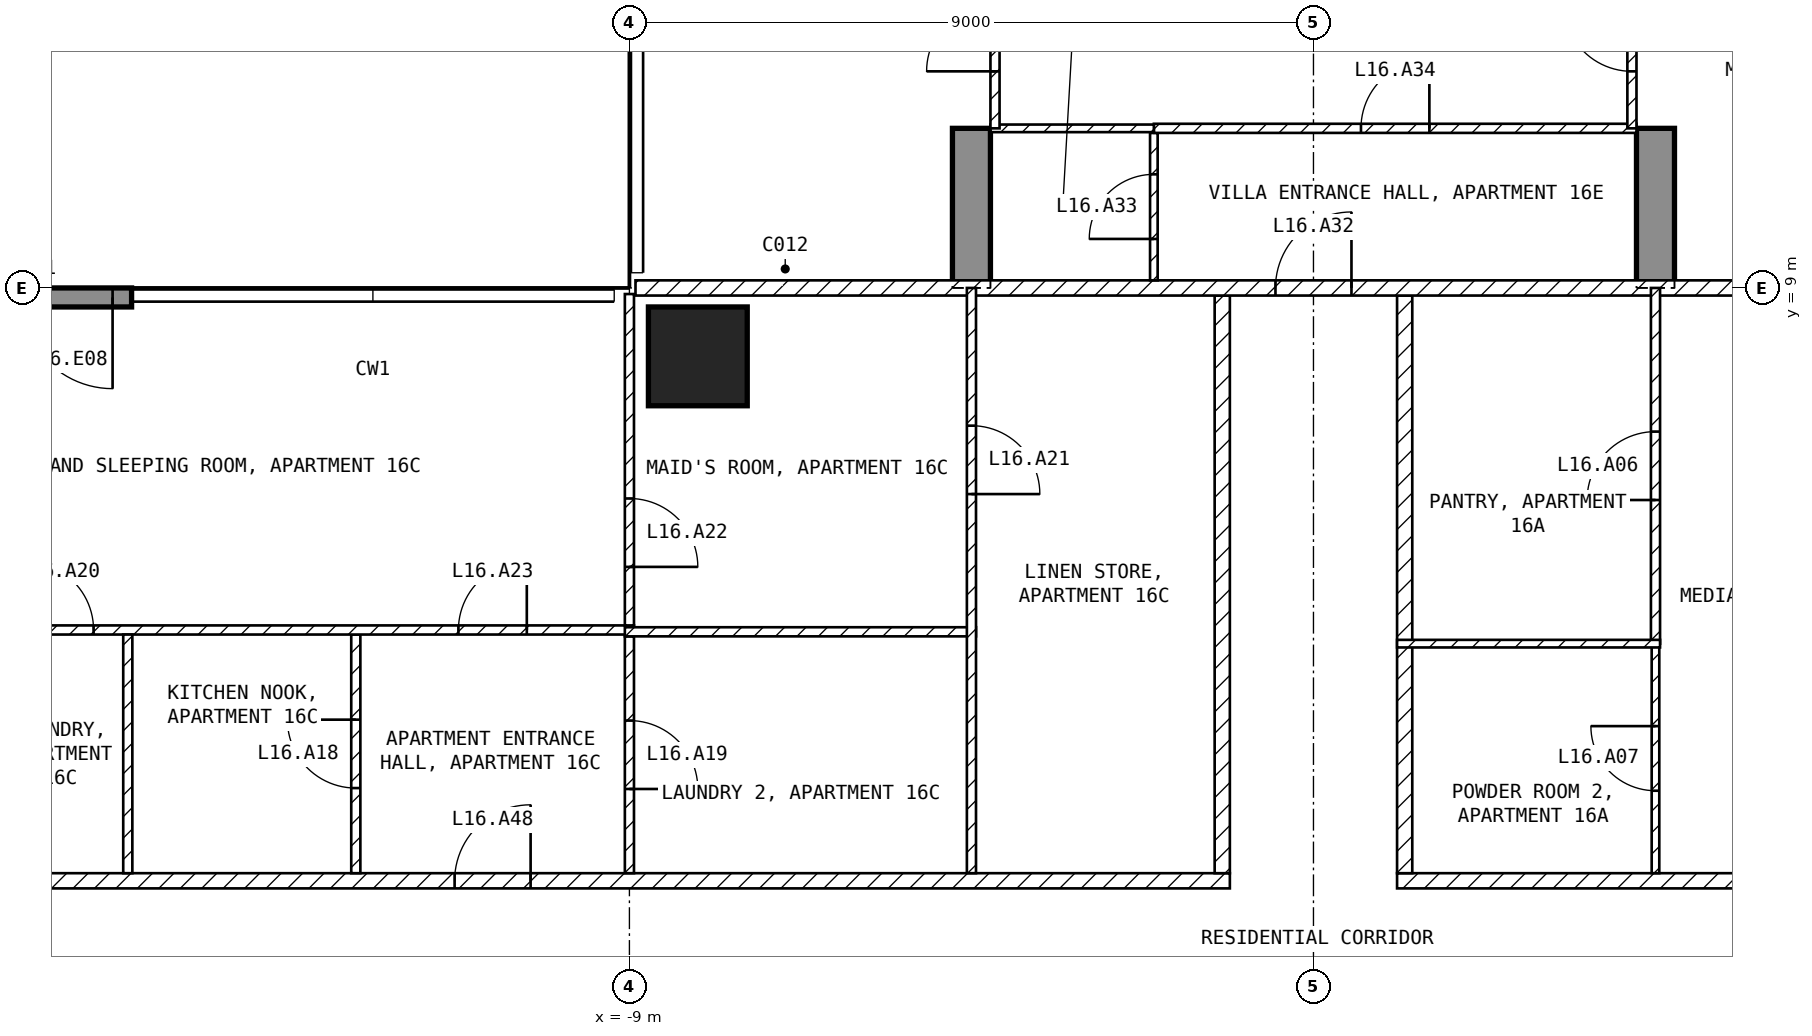
"""IFC4 building model, lengths in metres.
Left out: names, types, materials, properties, quantities, classifications, styles, units other than length and angle.
Written with IfcOpenShell. Run it as: python <this file> out.ifc"""

import sys

from ifc_helpers import new_model, si_unit, direction, frame, frame_2d, origin, origin_2d, place, context, subcontext, project, spatial, polyline, rectangle, outline, extrude, element, fill, save


model = new_model("IFC4")
c1 = context("Model", 3, precision=1e-05, world=origin(), true_north=direction((0.0, 1.0)))
c2 = subcontext(c1, "Body", "Model", "MODEL_VIEW")
j1 = project(units=[si_unit("LENGTHUNIT", "METRE"), si_unit("PLANEANGLEUNIT", "RADIAN")], contexts=[c1])
p1 = place(None, origin())
s1 = spatial("IfcSite", under=j1, at=p1, CompositionType="ELEMENT")
p2 = place(p1, origin())
s2 = spatial("IfcBuilding", under=s1, at=p2, CompositionType="ELEMENT")
p3 = place(p2, frame((0.0, 0.0, 75.0)))
s3 = spatial("IfcBuildingStorey", under=s2, at=p3, CompositionType="ELEMENT", Elevation=75.0)
p4 = place(p3, frame((-8.1, 8.1, -0.25), z_axis=(0.0, 0.0, 1.0), x_axis=(1.0, 0.0, 0.0)))
e1 = element("IfcColumn", 1, at=p4, inside=s3, PredefinedType="COLUMN", context=c2, shape_type="SweptSolid", body=[
    extrude(rectangle(XDim=1.3, YDim=1.3, at=origin_2d()), origin(), (0.0, 0.0, 1.0), 3.5),
])
for number, where, z_axis, x_axis in (
    (2, (-4.75, 9.0, -0.25), (1.0, 0.0, 0.0), (0.0, 1.0, 0.0)),
    (3, (4.25, 9.0, -0.25), (1.0, 0.0, 0.0), (0.0, 1.0, 0.0)),
):
    element("IfcWall", number, at=place(p3, frame(where, z_axis=z_axis, x_axis=x_axis)), inside=s3, PredefinedType="SHEAR", context=c2, shape_type="SweptSolid", body=[
        extrude(outline(polyline([(0.0, 0.0), (2.1, 0.0), (2.1, 2.65), (4.5, 2.65), (4.5, 0.0), (9.9, 0.0), (9.9, 2.65), (12.3, 2.65), (12.3, 0.0), (16.45, 0.0), (16.45, 3.5), (0.0, 3.5), (0.0, 0.0)])), origin(), (0.0, 0.0, 1.0), 0.5),
    ])
p5 = place(p3, frame((-15.55, 8.875, 0.0), z_axis=(0.0, 0.0, 1.0), x_axis=(-1.0, 0.0, 0.0)))
e4 = element("IfcWall", 4, at=p5, inside=s3, PredefinedType="SOLIDWALL", context=c2, shape_type="SweptSolid", body=[
    extrude(rectangle(XDim=2.65, YDim=0.25, at=frame_2d((1.325, 0.0))), origin(), (0.0, 0.0, 1.0), 3.25),
])
p6 = place(p5, frame((0.25, 0.0, 0.0)))
e5 = element("IfcOpeningElement", 5, at=p6, cuts=e4, PredefinedType="OPENING", context=c2, shape_type="SweptSolid", body=[
    extrude(rectangle(XDim=1.2, YDim=2.4, at=frame_2d((0.6, 1.2))), frame((0.0, 0.135, 0.0), z_axis=(0.0, -1.0, 0.0), x_axis=(1.0, 0.0, 0.0)), (0.0, 0.0, 1.0), 0.27),
])
p7 = place(p3, frame((1.1, 1.2, 0.0), z_axis=(0.0, 0.0, 1.0), x_axis=(1.0, 0.0, 0.0)))
e6 = element("IfcWall", 6, at=p7, inside=s3, PredefinedType="PARTITIONING", context=c2, shape_type="SweptSolid", body=[
    extrude(rectangle(XDim=20.5, YDim=0.2, at=frame_2d((10.25, 0.0))), origin(), (0.0, 0.0, 1.0), 3.25),
])
p8 = place(p7, frame((16.025, 0.0, 0.0)))
e7 = element("IfcOpeningElement", 7, at=p8, cuts=e6, PredefinedType="OPENING", context=c2, shape_type="SweptSolid", body=[
    extrude(rectangle(XDim=1.0, YDim=2.1, at=frame_2d((0.5, 1.05))), frame((0.0, 0.11, 0.0), z_axis=(0.0, -1.0, 0.0), x_axis=(1.0, 0.0, 0.0)), (0.0, 0.0, 1.0), 0.22),
])
p9 = place(p3, frame((1.2, 8.9, 0.0), z_axis=(0.0, 0.0, 1.0), x_axis=(0.0, -1.0, 0.0)))
e8 = element("IfcWall", 8, at=p9, inside=s3, PredefinedType="PARTITIONING", context=c2, shape_type="SweptSolid", body=[
    extrude(rectangle(XDim=7.6, YDim=0.2, at=frame_2d((3.8, 0.0))), origin(), (0.0, 0.0, 1.0), 3.25),
])
p10 = place(p3, frame((-21.6, 1.2, 0.0), z_axis=(0.0, 0.0, 1.0), x_axis=(1.0, 0.0, 0.0)))
e9 = element("IfcWall", 9, at=p10, inside=s3, PredefinedType="PARTITIONING", context=c2, shape_type="SweptSolid", body=[
    extrude(rectangle(XDim=20.5, YDim=0.2, at=frame_2d((10.25, 0.0))), origin(), (0.0, 0.0, 1.0), 3.25),
])
p11 = place(p10, frame((10.3, 0.0, 0.0)))
e10 = element("IfcOpeningElement", 10, at=p11, cuts=e9, PredefinedType="OPENING", context=c2, shape_type="SweptSolid", body=[
    extrude(rectangle(XDim=1.0, YDim=2.1, at=frame_2d((0.5, 1.05))), frame((0.0, 0.11, 0.0), z_axis=(0.0, -1.0, 0.0), x_axis=(1.0, 0.0, 0.0)), (0.0, 0.0, 1.0), 0.22),
])
p12 = place(p3, frame((-1.2, 1.3, 0.0), z_axis=(0.0, 0.0, 1.0), x_axis=(0.0, 1.0, 0.0)))
e11 = element("IfcWall", 11, at=p12, inside=s3, PredefinedType="PARTITIONING", context=c2, shape_type="SweptSolid", body=[
    extrude(rectangle(XDim=7.6, YDim=0.2, at=frame_2d((3.8, 0.0))), origin(), (0.0, 0.0, 1.0), 3.25),
])
p13 = place(p3, frame((-8.92, 9.0, 0.0), z_axis=(0.0, 0.0, 1.0), x_axis=(1.0, 0.0, 0.0)))
e12 = element("IfcWall", 12, at=p13, inside=s3, PredefinedType="PARTITIONING", context=c2, shape_type="SweptSolid", body=[
    extrude(rectangle(XDim=17.84, YDim=0.2, at=frame_2d((8.92, 0.0))), origin(), (0.0, 0.0, 1.0), 3.25),
])
p14 = place(p13, frame((8.42, 0.0, 0.0)))
e13 = element("IfcOpeningElement", 13, at=p14, cuts=e12, PredefinedType="OPENING", context=c2, shape_type="SweptSolid", body=[
    extrude(rectangle(XDim=1.0, YDim=2.1, at=frame_2d((0.5, 1.05))), frame((0.0, 0.11, 0.0), z_axis=(0.0, -1.0, 0.0), x_axis=(1.0, 0.0, 0.0)), (0.0, 0.0, 1.0), 0.22),
])
p15 = place(p3, frame((4.5, 1.3, 0.0), z_axis=(0.0, 0.0, 1.0), x_axis=(0.0, 1.0, 0.0)))
e14 = element("IfcWall", 14, at=p15, inside=s3, PredefinedType="PARTITIONING", context=c2, shape_type="SweptSolid", body=[
    extrude(rectangle(XDim=3.02, YDim=0.1, at=frame_2d((1.51, 0.0))), origin(), (0.0, 0.0, 1.0), 3.25),
])
p16 = place(p15, frame((1.085, 0.0, 0.0)))
e15 = element("IfcOpeningElement", 15, at=p16, cuts=e14, PredefinedType="OPENING", context=c2, shape_type="SweptSolid", body=[
    extrude(rectangle(XDim=0.85, YDim=2.1, at=frame_2d((0.425, 1.05))), frame((0.0, 0.06, 0.0), z_axis=(0.0, -1.0, 0.0), x_axis=(1.0, 0.0, 0.0)), (0.0, 0.0, 1.0), 0.12),
])
p17 = place(p3, frame((4.5, 4.32, 0.0), z_axis=(0.0, 0.0, 1.0), x_axis=(0.0, 1.0, 0.0)))
e16 = element("IfcWall", 16, at=p17, inside=s3, PredefinedType="PARTITIONING", context=c2, shape_type="SweptSolid", body=[
    extrude(rectangle(XDim=4.68, YDim=0.12, at=frame_2d((2.34, 0.0))), origin(), (0.0, 0.0, 1.0), 3.25),
])
p18 = place(p17, frame((1.89, 0.0, 0.0)))
e17 = element("IfcOpeningElement", 17, at=p18, cuts=e16, PredefinedType="OPENING", context=c2, shape_type="SweptSolid", body=[
    extrude(rectangle(XDim=0.9, YDim=2.1, at=frame_2d((0.45, 1.05))), frame((0.0, 0.07, 0.0), z_axis=(0.0, -1.0, 0.0), x_axis=(1.0, 0.0, 0.0)), (0.0, 0.0, 1.0), 0.14),
])
p19 = place(p3, frame((1.1, 4.32, 0.0), z_axis=(0.0, 0.0, 1.0), x_axis=(1.0, 0.0, 0.0)))
e18 = element("IfcWall", 18, at=p19, inside=s3, PredefinedType="PARTITIONING", context=c2, shape_type="SweptSolid", body=[
    extrude(rectangle(XDim=3.46, YDim=0.1, at=frame_2d((1.73, 0.0))), origin(), (0.0, 0.0, 1.0), 3.25),
])
p20 = place(p3, frame((-12.6, 1.3, 0.0), z_axis=(0.0, 0.0, 1.0), x_axis=(0.0, 1.0, 0.0)))
e19 = element("IfcWall", 19, at=p20, inside=s3, PredefinedType="PARTITIONING", context=c2, shape_type="SweptSolid", body=[
    extrude(rectangle(XDim=3.14, YDim=0.12, at=frame_2d((1.57, 0.0))), origin(), (0.0, 0.0, 1.0), 3.25),
])
p21 = place(p20, frame((1.12, 0.0, 0.0)))
e20 = element("IfcOpeningElement", 20, at=p21, cuts=e19, PredefinedType="OPENING", context=c2, shape_type="SweptSolid", body=[
    extrude(rectangle(XDim=0.9, YDim=2.1, at=frame_2d((0.45, 1.05))), frame((0.0, 0.07, 0.0), z_axis=(0.0, -1.0, 0.0), x_axis=(1.0, 0.0, 0.0)), (0.0, 0.0, 1.0), 0.14),
])
p22 = place(p3, frame((-17.4, 4.5, 0.0), z_axis=(0.0, 0.0, 1.0), x_axis=(1.0, 0.0, 0.0)))
e21 = element("IfcWall", 21, at=p22, inside=s3, PredefinedType="PARTITIONING", context=c2, shape_type="SweptSolid", body=[
    extrude(rectangle(XDim=8.46, YDim=0.12, at=frame_2d((4.23, 0.0))), origin(), (0.0, 0.0, 1.0), 3.25),
])
p23 = place(p22, frame((0.45, 0.0, 0.0)))
e22 = element("IfcOpeningElement", 22, at=p23, cuts=e21, PredefinedType="OPENING", context=c2, shape_type="SweptSolid", body=[
    extrude(rectangle(XDim=0.9, YDim=2.1, at=frame_2d((0.45, 1.05))), frame((0.0, 0.07, 0.0), z_axis=(0.0, -1.0, 0.0), x_axis=(1.0, 0.0, 0.0)), (0.0, 0.0, 1.0), 0.14),
])
p24 = place(p22, frame((6.15, 0.0, 0.0)))
e23 = element("IfcOpeningElement", 23, at=p24, cuts=e21, PredefinedType="OPENING", context=c2, shape_type="SweptSolid", body=[
    extrude(rectangle(XDim=0.9, YDim=2.1, at=frame_2d((0.45, 1.05))), frame((0.0, 0.07, 0.0), z_axis=(0.0, -1.0, 0.0), x_axis=(1.0, 0.0, 0.0)), (0.0, 0.0, 1.0), 0.14),
])
p25 = place(p3, frame((-9.0, 4.416, 0.0), z_axis=(0.0, 0.0, 1.0), x_axis=(0.0, -1.0, 0.0)))
e24 = element("IfcWall", 24, at=p25, inside=s3, PredefinedType="PARTITIONING", context=c2, shape_type="SweptSolid", body=[
    extrude(rectangle(XDim=3.116, YDim=0.12, at=frame_2d((1.558, 0.0))), origin(), (0.0, 0.0, 1.0), 3.25),
])
p26 = place(p25, frame((1.108, 0.0, 0.0)))
e25 = element("IfcOpeningElement", 25, at=p26, cuts=e24, PredefinedType="OPENING", context=c2, shape_type="SweptSolid", body=[
    extrude(rectangle(XDim=0.9, YDim=2.1, at=frame_2d((0.45, 1.05))), frame((0.0, 0.07, 0.0), z_axis=(0.0, -1.0, 0.0), x_axis=(1.0, 0.0, 0.0)), (0.0, 0.0, 1.0), 0.14),
])
p27 = place(p3, frame((-15.6, 1.3, 0.0), z_axis=(0.0, 0.0, 1.0), x_axis=(0.0, 1.0, 0.0)))
e26 = element("IfcWall", 26, at=p27, inside=s3, PredefinedType="PARTITIONING", context=c2, shape_type="SweptSolid", body=[
    extrude(rectangle(XDim=3.14, YDim=0.12, at=frame_2d((1.57, 0.0))), origin(), (0.0, 0.0, 1.0), 3.25),
])
p28 = place(p3, frame((-9.0, 8.92, 0.0), z_axis=(0.0, 0.0, 1.0), x_axis=(0.0, -1.0, 0.0)))
e27 = element("IfcWall", 27, at=p28, inside=s3, PredefinedType="PARTITIONING", context=c2, shape_type="SweptSolid", body=[
    extrude(rectangle(XDim=4.36, YDim=0.12, at=frame_2d((2.18, 0.0))), origin(), (0.0, 0.0, 1.0), 3.25),
])
p29 = place(p28, frame((2.69, 0.0, 0.0)))
e28 = element("IfcOpeningElement", 28, at=p29, cuts=e27, PredefinedType="OPENING", context=c2, shape_type="SweptSolid", body=[
    extrude(rectangle(XDim=0.9, YDim=2.1, at=frame_2d((0.45, 1.05))), frame((0.0, 0.07, 0.0), z_axis=(0.0, -1.0, 0.0), x_axis=(1.0, 0.0, 0.0)), (0.0, 0.0, 1.0), 0.14),
])
p30 = place(p3, frame((-9.06, 4.476, 0.0), z_axis=(0.0, 0.0, 1.0), x_axis=(1.0, 0.0, 0.0)))
e29 = element("IfcWall", 29, at=p30, inside=s3, PredefinedType="PARTITIONING", context=c2, shape_type="SweptSolid", body=[
    extrude(rectangle(XDim=4.62, YDim=0.12, at=frame_2d((2.31, 0.0))), origin(), (0.0, 0.0, 1.0), 3.25),
])
p31 = place(p3, frame((-4.5, 9.0, 0.0), z_axis=(0.0, 0.0, 1.0), x_axis=(0.0, -1.0, 0.0)))
e30 = element("IfcWall", 30, at=p31, inside=s3, PredefinedType="PARTITIONING", context=c2, shape_type="SweptSolid", body=[
    extrude(rectangle(XDim=7.7, YDim=0.12, at=frame_2d((3.85, 0.0))), origin(), (0.0, 0.0, 1.0), 3.25),
])
p32 = place(p31, frame((1.812, 0.0, 0.0)))
e31 = element("IfcOpeningElement", 31, at=p32, cuts=e30, PredefinedType="OPENING", context=c2, shape_type="SweptSolid", body=[
    extrude(rectangle(XDim=0.9, YDim=2.1, at=frame_2d((0.45, 1.05))), frame((0.0, 0.07, 0.0), z_axis=(0.0, -1.0, 0.0), x_axis=(1.0, 0.0, 0.0)), (0.0, 0.0, 1.0), 0.14),
])
p33 = place(p3, frame((-2.1, 9.1, 0.0), z_axis=(0.0, 0.0, 1.0), x_axis=(0.0, 1.0, 0.0)))
e32 = element("IfcWall", 32, at=p33, inside=s3, PredefinedType="PARTITIONING", context=c2, shape_type="SweptSolid", body=[
    extrude(rectangle(XDim=1.94, YDim=0.1, at=frame_2d((0.97, 0.0))), origin(), (0.0, 0.0, 1.0), 3.25),
])
p34 = place(p33, frame((0.545, 0.0, 0.0)))
e33 = element("IfcOpeningElement", 33, at=p34, cuts=e32, PredefinedType="OPENING", context=c2, shape_type="SweptSolid", body=[
    extrude(rectangle(XDim=0.85, YDim=2.1, at=frame_2d((0.425, 1.05))), frame((0.0, 0.06, 0.0), z_axis=(0.0, -1.0, 0.0), x_axis=(1.0, 0.0, 0.0)), (0.0, 0.0, 1.0), 0.12),
])
p35 = place(p3, frame((-2.1, 11.1, 0.0), z_axis=(0.0, 0.0, 1.0), x_axis=(1.0, 0.0, 0.0)))
e34 = element("IfcWall", 34, at=p35, inside=s3, PredefinedType="PARTITIONING", context=c2, shape_type="SweptSolid", body=[
    extrude(rectangle(XDim=6.35, YDim=0.12, at=frame_2d((3.175, 0.0))), origin(), (0.0, 0.0, 1.0), 3.25),
])
p36 = place(p35, frame((2.725, 0.0, 0.0)))
e35 = element("IfcOpeningElement", 35, at=p36, cuts=e34, PredefinedType="OPENING", context=c2, shape_type="SweptSolid", body=[
    extrude(rectangle(XDim=0.9, YDim=2.1, at=frame_2d((0.45, 1.05))), frame((0.0, 0.07, 0.0), z_axis=(0.0, -1.0, 0.0), x_axis=(1.0, 0.0, 0.0)), (0.0, 0.0, 1.0), 0.14),
])
p37 = place(p3, frame((-4.25, 11.1, 0.0), z_axis=(0.0, 0.0, 1.0), x_axis=(1.0, 0.0, 0.0)))
e36 = element("IfcWall", 36, at=p37, inside=s3, PredefinedType="PARTITIONING", context=c2, shape_type="SweptSolid", body=[
    extrude(rectangle(XDim=2.15, YDim=0.1, at=frame_2d((1.075, 0.0))), origin(), (0.0, 0.0, 1.0), 3.25),
])
p38 = place(p3, frame((4.19, 11.1, 0.0), z_axis=(0.0, 0.0, 1.0), x_axis=(0.0, 1.0, 0.0)))
e37 = element("IfcWall", 37, at=p38, inside=s3, PredefinedType="PARTITIONING", context=c2, shape_type="SweptSolid", body=[
    extrude(rectangle(XDim=2.4, YDim=0.12, at=frame_2d((1.2, 0.0))), origin(), (0.0, 0.0, 1.0), 2.4),
])
p39 = place(p38, frame((0.75, 0.0, 0.0)))
e38 = element("IfcOpeningElement", 38, at=p39, cuts=e37, PredefinedType="OPENING", context=c2, shape_type="SweptSolid", body=[
    extrude(rectangle(XDim=0.9, YDim=2.1, at=frame_2d((0.45, 1.05))), frame((0.0, 0.07, 0.0), z_axis=(0.0, -1.0, 0.0), x_axis=(1.0, 0.0, 0.0)), (0.0, 0.0, 1.0), 0.14),
])
p40 = place(p3, frame((-4.19, 11.1, 0.0), z_axis=(0.0, 0.0, 1.0), x_axis=(0.0, 1.0, 0.0)))
e39 = element("IfcWall", 39, at=p40, inside=s3, PredefinedType="PARTITIONING", context=c2, shape_type="SweptSolid", body=[
    extrude(rectangle(XDim=2.4, YDim=0.12, at=frame_2d((1.2, 0.0))), origin(), (0.0, 0.0, 1.0), 2.4),
])
p41 = place(p40, frame((0.75, 0.0, 0.0)))
e40 = element("IfcOpeningElement", 40, at=p41, cuts=e39, PredefinedType="OPENING", context=c2, shape_type="SweptSolid", body=[
    extrude(rectangle(XDim=0.9, YDim=2.1, at=frame_2d((0.45, 1.05))), frame((0.0, 0.07, 0.0), z_axis=(0.0, -1.0, 0.0), x_axis=(1.0, 0.0, 0.0)), (0.0, 0.0, 1.0), 0.14),
])
p42 = place(p6, origin())
e41 = element("IfcDoor", 41, at=p42, inside=s3, OperationType="SINGLE_SWING_LEFT", PredefinedType="DOOR", context=c2, shape_type="SweptSolid", body=[
    extrude(rectangle(XDim=1.2, YDim=2.4, at=frame_2d((0.6, 1.2))), frame((0.0, 0.025, 0.0), z_axis=(0.0, -1.0, 0.0), x_axis=(1.0, 0.0, 0.0)), (0.0, 0.0, 1.0), 0.05),
])
fill(e5, e41)
p43 = place(p18, origin())
e42 = element("IfcDoor", 42, at=p43, inside=s3, OperationType="SINGLE_SWING_LEFT", PredefinedType="DOOR", context=c2, shape_type="SweptSolid", body=[
    extrude(rectangle(XDim=0.9, YDim=2.1, at=frame_2d((0.45, 1.05))), frame((0.0, 0.025, 0.0), z_axis=(0.0, -1.0, 0.0), x_axis=(1.0, 0.0, 0.0)), (0.0, 0.0, 1.0), 0.05),
])
fill(e17, e42)
p44 = place(p16, origin())
e43 = element("IfcDoor", 43, at=p44, inside=s3, OperationType="SINGLE_SWING_RIGHT", PredefinedType="DOOR", context=c2, shape_type="SweptSolid", body=[
    extrude(rectangle(XDim=0.85, YDim=2.1, at=frame_2d((0.425, 1.05))), frame((0.0, 0.025, 0.0), z_axis=(0.0, -1.0, 0.0), x_axis=(1.0, 0.0, 0.0)), (0.0, 0.0, 1.0), 0.05),
])
fill(e15, e43)
p45 = place(p21, origin())
e44 = element("IfcDoor", 44, at=p45, inside=s3, OperationType="SINGLE_SWING_RIGHT", PredefinedType="DOOR", context=c2, shape_type="SweptSolid", body=[
    extrude(rectangle(XDim=0.9, YDim=2.1, at=frame_2d((0.45, 1.05))), frame((0.0, 0.025, 0.0), z_axis=(0.0, -1.0, 0.0), x_axis=(1.0, 0.0, 0.0)), (0.0, 0.0, 1.0), 0.05),
])
fill(e20, e44)
p46 = place(p26, origin())
e45 = element("IfcDoor", 45, at=p46, inside=s3, OperationType="SINGLE_SWING_RIGHT", PredefinedType="DOOR", context=c2, shape_type="SweptSolid", body=[
    extrude(rectangle(XDim=0.9, YDim=2.1, at=frame_2d((0.45, 1.05))), frame((0.0, 0.025, 0.0), z_axis=(0.0, -1.0, 0.0), x_axis=(1.0, 0.0, 0.0)), (0.0, 0.0, 1.0), 0.05),
])
fill(e25, e45)
p47 = place(p23, origin())
e46 = element("IfcDoor", 46, at=p47, inside=s3, OperationType="SINGLE_SWING_LEFT", PredefinedType="DOOR", context=c2, shape_type="SweptSolid", body=[
    extrude(rectangle(XDim=0.9, YDim=2.1, at=frame_2d((0.45, 1.05))), frame((0.0, 0.025, 0.0), z_axis=(0.0, -1.0, 0.0), x_axis=(1.0, 0.0, 0.0)), (0.0, 0.0, 1.0), 0.05),
])
fill(e22, e46)
p48 = place(p32, origin())
e47 = element("IfcDoor", 47, at=p48, inside=s3, OperationType="SINGLE_SWING_RIGHT", PredefinedType="DOOR", context=c2, shape_type="SweptSolid", body=[
    extrude(rectangle(XDim=0.9, YDim=2.1, at=frame_2d((0.45, 1.05))), frame((0.0, 0.025, 0.0), z_axis=(0.0, -1.0, 0.0), x_axis=(1.0, 0.0, 0.0)), (0.0, 0.0, 1.0), 0.05),
])
fill(e31, e47)
p49 = place(p29, origin())
e48 = element("IfcDoor", 48, at=p49, inside=s3, OperationType="SINGLE_SWING_RIGHT", PredefinedType="DOOR", context=c2, shape_type="SweptSolid", body=[
    extrude(rectangle(XDim=0.9, YDim=2.1, at=frame_2d((0.45, 1.05))), frame((0.0, 0.025, 0.0), z_axis=(0.0, -1.0, 0.0), x_axis=(1.0, 0.0, 0.0)), (0.0, 0.0, 1.0), 0.05),
])
fill(e28, e48)
p50 = place(p24, origin())
e49 = element("IfcDoor", 49, at=p50, inside=s3, OperationType="SINGLE_SWING_RIGHT", PredefinedType="DOOR", context=c2, shape_type="SweptSolid", body=[
    extrude(rectangle(XDim=0.9, YDim=2.1, at=frame_2d((0.45, 1.05))), frame((0.0, 0.025, 0.0), z_axis=(0.0, -1.0, 0.0), x_axis=(1.0, 0.0, 0.0)), (0.0, 0.0, 1.0), 0.05),
])
fill(e23, e49)
p51 = place(p14, origin())
e50 = element("IfcDoor", 50, at=p51, inside=s3, OperationType="SINGLE_SWING_RIGHT", PredefinedType="DOOR", context=c2, shape_type="SweptSolid", body=[
    extrude(rectangle(XDim=1.0, YDim=2.1, at=frame_2d((0.5, 1.05))), frame((0.0, 0.025, 0.0), z_axis=(0.0, -1.0, 0.0), x_axis=(1.0, 0.0, 0.0)), (0.0, 0.0, 1.0), 0.05),
])
fill(e13, e50)
p52 = place(p34, origin())
e51 = element("IfcDoor", 51, at=p52, inside=s3, OperationType="SINGLE_SWING_LEFT", PredefinedType="DOOR", context=c2, shape_type="SweptSolid", body=[
    extrude(rectangle(XDim=0.85, YDim=2.1, at=frame_2d((0.425, 1.05))), frame((0.0, 0.025, 0.0), z_axis=(0.0, -1.0, 0.0), x_axis=(1.0, 0.0, 0.0)), (0.0, 0.0, 1.0), 0.05),
])
fill(e33, e51)
p53 = place(p36, origin())
e52 = element("IfcDoor", 52, at=p53, inside=s3, OperationType="SINGLE_SWING_RIGHT", PredefinedType="DOOR", context=c2, shape_type="SweptSolid", body=[
    extrude(rectangle(XDim=0.9, YDim=2.1, at=frame_2d((0.45, 1.05))), frame((0.0, 0.025, 0.0), z_axis=(0.0, -1.0, 0.0), x_axis=(1.0, 0.0, 0.0)), (0.0, 0.0, 1.0), 0.05),
])
fill(e35, e52)
p54 = place(p11, origin())
e53 = element("IfcDoor", 53, at=p54, inside=s3, OperationType="SINGLE_SWING_RIGHT", PredefinedType="DOOR", context=c2, shape_type="SweptSolid", body=[
    extrude(rectangle(XDim=1.0, YDim=2.1, at=frame_2d((0.5, 1.05))), frame((0.0, 0.025, 0.0), z_axis=(0.0, -1.0, 0.0), x_axis=(1.0, 0.0, 0.0)), (0.0, 0.0, 1.0), 0.05),
])
fill(e10, e53)
p55 = place(p39, origin())
e54 = element("IfcDoor", 54, at=p55, inside=s3, OperationType="SINGLE_SWING_RIGHT", PredefinedType="DOOR", context=c2, shape_type="SweptSolid", body=[
    extrude(rectangle(XDim=0.9, YDim=2.1, at=frame_2d((0.45, 1.05))), frame((0.0, 0.025, 0.0), z_axis=(0.0, -1.0, 0.0), x_axis=(1.0, 0.0, 0.0)), (0.0, 0.0, 1.0), 0.05),
])
fill(e38, e54)
p56 = place(p41, origin())
e55 = element("IfcDoor", 55, at=p56, inside=s3, OperationType="SINGLE_SWING_LEFT", PredefinedType="DOOR", context=c2, shape_type="SweptSolid", body=[
    extrude(rectangle(XDim=0.9, YDim=2.1, at=frame_2d((0.45, 1.05))), frame((0.0, 0.025, 0.0), z_axis=(0.0, -1.0, 0.0), x_axis=(1.0, 0.0, 0.0)), (0.0, 0.0, 1.0), 0.05),
])
fill(e40, e55)
save(model, sys.argv[1])
